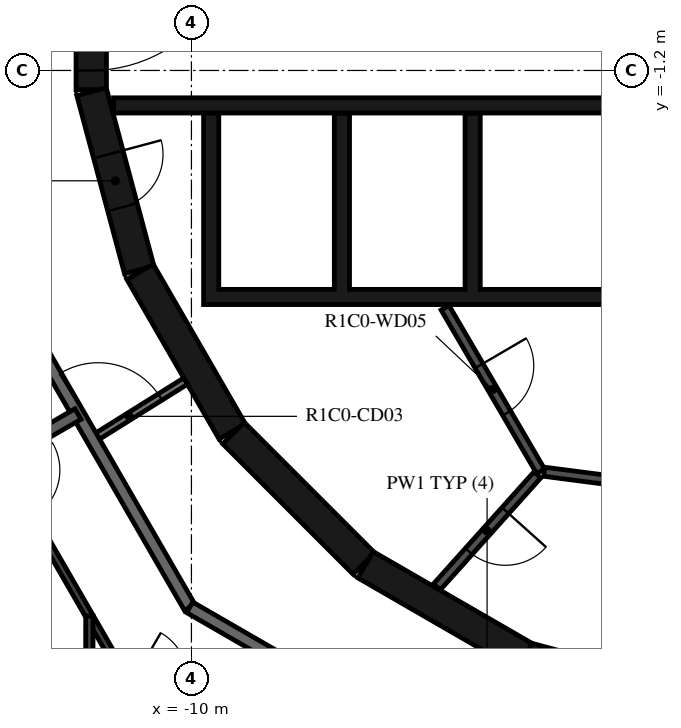
"""IFC4 building model, lengths in metres.
Left out: names, types, materials, properties, quantities, classifications, styles, units other than length and angle.
Written with IfcOpenShell. Run it as: python <this file> out.ifc"""

import sys

from ifc_helpers import new_model, si_unit, direction, frame, frame_2d, origin, place, context, subcontext, project, spatial, polyline, rectangle, outline, extrude, element, fill, save


model = new_model("IFC4")
c1 = context("Model", 3, precision=1e-05, world=origin(), true_north=direction((0.0, 1.0)))
c2 = subcontext(c1, "Body", "Model", "MODEL_VIEW")
j1 = project(units=[si_unit("LENGTHUNIT", "METRE"), si_unit("PLANEANGLEUNIT", "RADIAN")], contexts=[c1])
p1 = place(None, origin())
s1 = spatial("IfcSite", under=j1, at=p1, CompositionType="ELEMENT")
p2 = place(p1, origin())
s2 = spatial("IfcBuilding", under=s1, at=p2, CompositionType="ELEMENT")
p3 = place(p2, frame((0.0, 0.0, 66.4)))
s3 = spatial("IfcBuildingStorey", under=s2, at=p3, CompositionType="ELEMENT", Elevation=66.4)
p4 = place(p3, frame((-11.647, 1.516, 0.0), z_axis=(0.0, 0.0, 1.0), x_axis=(0.0, -1.0, 0.0)))
e1 = element("IfcWall", 1, at=p4, inside=s3, PredefinedType="SHEAR", context=c2, shape_type="SweptSolid", body=[
    extrude(rectangle(XDim=3.033, YDim=0.5, at=frame_2d((1.516, 0.0))), origin(), (0.0, 0.0, 1.0), 3.05),
])
p5 = place(p4, frame((0.316, 0.0, 0.0)))
e2 = element("IfcOpeningElement", 2, at=p5, cuts=e1, PredefinedType="OPENING", context=c2, shape_type="SweptSolid", body=[
    extrude(rectangle(XDim=2.4, YDim=2.1, at=frame_2d((1.2, 1.05))), frame((0.0, 0.26, 0.0), z_axis=(0.0, -1.0, 0.0), x_axis=(1.0, 0.0, 0.0)), (0.0, 0.0, 1.0), 0.52),
])
p6 = place(p3, frame((-11.643, -1.55, 0.0), z_axis=(0.0, 0.0, 1.0), x_axis=(0.258734743916, -0.965948410781, 0.0)))
e3 = element("IfcWall", 3, at=p6, inside=s3, PredefinedType="SHEAR", context=c2, shape_type="SweptSolid", body=[
    extrude(rectangle(XDim=3.033, YDim=0.5, at=frame_2d((1.516, 0.0))), origin(), (0.0, 0.0, 1.0), 3.05),
])
p7 = place(p6, frame((1.066, 0.0, 0.0)))
e4 = element("IfcOpeningElement", 4, at=p7, cuts=e3, PredefinedType="OPENING", context=c2, shape_type="SweptSolid", body=[
    extrude(rectangle(XDim=0.9, YDim=2.1, at=frame_2d((0.45, 1.05))), frame((0.0, 0.26, 0.0), z_axis=(0.0, -1.0, 0.0), x_axis=(1.0, 0.0, 0.0)), (0.0, 0.0, 1.0), 0.52),
])
p8 = place(p3, frame((-10.845, -4.51, 0.0), z_axis=(0.0, 0.0, 1.0), x_axis=(0.500087131594, -0.865975092491, 0.0)))
e5 = element("IfcWall", 5, at=p8, inside=s3, PredefinedType="SHEAR", context=c2, shape_type="SweptSolid", body=[
    extrude(rectangle(XDim=3.033, YDim=0.5, at=frame_2d((1.516, 0.0))), origin(), (0.0, 0.0, 1.0), 3.05),
])
p9 = place(p3, frame((-9.308, -7.164, 0.0), z_axis=(0.0, 0.0, 1.0), x_axis=(0.707106781187, -0.707106781187, 0.0)))
e6 = element("IfcWall", 6, at=p9, inside=s3, PredefinedType="SHEAR", context=c2, shape_type="SweptSolid", body=[
    extrude(rectangle(XDim=3.032, YDim=0.5, at=frame_2d((1.516, 0.0))), origin(), (0.0, 0.0, 1.0), 3.05),
])
for number, where, z_axis, x_axis in (
    (7, (-7.137, -9.329, 0.0), (0.0, 0.0, 1.0), (0.866, -0.5, 0.0)),
    (8, (-4.479, -10.858, 0.0), (0.0, 0.0, 1.0), (0.966, -0.259, 0.0)),
):
    element("IfcWall", number, at=place(p3, frame(where, z_axis=z_axis, x_axis=x_axis)), inside=s3, PredefinedType="SHEAR", context=c2, shape_type="SweptSolid", body=[
        extrude(rectangle(XDim=3.033, YDim=0.5, at=frame_2d((1.516, 0.0))), origin(), (0.0, 0.0, 1.0), 3.05),
    ])
p10 = place(p3, origin())
e9 = element("IfcWall", 9, at=p10, inside=s3, PredefinedType="SHEAR", context=c2, shape_type="SweptSolid", body=[
    extrude(outline(polyline([(9.8, -5.05), (9.8, -4.8), (9.8, -1.9), (9.55, -1.9), (9.55, -4.8), (7.65, -4.8), (7.65, -1.9), (7.4, -1.9), (7.4, -4.8), (5.5, -4.8), (5.5, -1.9), (5.25, -1.9), (5.25, -4.8), (3.35, -4.8), (3.35, -1.9), (3.1, -1.9), (3.1, -4.8), (-5.25, -4.8), (-5.25, -1.9), (-5.5, -1.9), (-5.5, -4.8), (-7.4, -4.8), (-7.4, -1.9), (-7.65, -1.9), (-7.65, -4.8), (-9.55, -4.8), (-9.55, -1.9), (-9.8, -1.9), (-9.8, -4.8), (-9.8, -5.05), (9.8, -5.05)])), origin(), (0.0, 0.0, 1.0), 3.05),
])
p11 = place(p3, frame((-11.28, -1.775, 0.0), z_axis=(0.0, 0.0, 1.0), x_axis=(1.0, 0.0, 0.0)))
e10 = element("IfcWall", 10, at=p11, inside=s3, PredefinedType="SHEAR", context=c2, shape_type="SweptSolid", body=[
    extrude(rectangle(XDim=14.38, YDim=0.25, at=frame_2d((7.19, 0.0))), origin(), (0.0, 0.0, 1.0), 3.05),
])
p12 = place(p11, frame((9.755, 0.0, 0.0)))
e11 = element("IfcOpeningElement", 11, at=p12, cuts=e10, PredefinedType="OPENING", context=c2, shape_type="SweptSolid", body=[
    extrude(rectangle(XDim=0.9, YDim=2.1, at=frame_2d((0.45, 1.05))), frame((0.0, 0.135, 0.0), z_axis=(0.0, -1.0, 0.0), x_axis=(1.0, 0.0, 0.0)), (0.0, 0.0, 1.0), 0.27),
])
p13 = place(p3, frame((-5.829, -5.102, 0.0), z_axis=(0.0, 0.0, 1.0), x_axis=(0.504480008384, -0.863423373057, 0.0)))
e12 = element("IfcWall", 12, at=p13, inside=s3, PredefinedType="PARTITIONING", context=c2, shape_type="SweptSolid", body=[
    extrude(rectangle(XDim=3.115, YDim=0.15, at=frame_2d((1.558, 0.0))), origin(), (0.0, 0.0, 1.0), 3.05),
])
p14 = place(p13, frame((1.107, 0.0, 0.0)))
e13 = element("IfcOpeningElement", 13, at=p14, cuts=e12, PredefinedType="OPENING", context=c2, shape_type="SweptSolid", body=[
    extrude(rectangle(XDim=0.9, YDim=2.1, at=frame_2d((0.45, 1.05))), frame((0.0, 0.085, 0.0), z_axis=(0.0, -1.0, 0.0), x_axis=(1.0, 0.0, 0.0)), (0.0, 0.0, 1.0), 0.17),
])
p15 = place(p3, frame((-4.311, -7.851, 0.0), z_axis=(0.0, 0.0, 1.0), x_axis=(-0.667869133096, -0.744278725383, 0.0)))
e14 = element("IfcWall", 14, at=p15, inside=s3, PredefinedType="PARTITIONING", context=c2, shape_type="SweptSolid", body=[
    extrude(rectangle(XDim=2.476, YDim=0.15, at=frame_2d((1.238, 0.0))), origin(), (0.0, 0.0, 1.0), 3.05),
])
p16 = place(p15, frame((0.788, 0.0, 0.0)))
e15 = element("IfcOpeningElement", 15, at=p16, cuts=e14, PredefinedType="OPENING", context=c2, shape_type="SweptSolid", body=[
    extrude(rectangle(XDim=0.9, YDim=2.1, at=frame_2d((0.45, 1.05))), frame((0.0, 0.085, 0.0), z_axis=(0.0, -1.0, 0.0), x_axis=(1.0, 0.0, 0.0)), (0.0, 0.0, 1.0), 0.17),
])
p17 = place(p3, frame((-4.198, -7.799, 0.0), z_axis=(0.0, 0.0, 1.0), x_axis=(0.991686747293, -0.128675542523, 0.0)))
e16 = element("IfcWall", 16, at=p17, inside=s3, PredefinedType="PARTITIONING", context=c2, shape_type="SweptSolid", body=[
    extrude(rectangle(XDim=1.793, YDim=0.15, at=frame_2d((0.896, 0.0))), origin(), (0.0, 0.0, 1.0), 3.05),
])
p18 = place(p3, frame((-11.625, -7.264, 0.0), z_axis=(0.0, 0.0, 1.0), x_axis=(0.84803632456, 0.529938102259, 0.0)))
e17 = element("IfcWall", 17, at=p18, inside=s3, PredefinedType="PARTITIONING", context=c2, shape_type="SweptSolid", body=[
    extrude(rectangle(XDim=1.804, YDim=0.12, at=frame_2d((0.902, 0.0))), origin(), (0.0, 0.0, 1.0), 3.05),
])
p19 = place(p18, frame((0.11, 0.0, 0.0)))
e18 = element("IfcOpeningElement", 18, at=p19, cuts=e17, PredefinedType="OPENING", context=c2, shape_type="SweptSolid", body=[
    extrude(rectangle(XDim=1.2, YDim=2.1, at=frame_2d((0.6, 1.05))), frame((0.0, 0.07, 0.0), z_axis=(0.0, -1.0, 0.0), x_axis=(1.0, 0.0, 0.0)), (0.0, 0.0, 1.0), 0.14),
])
p20 = place(p3, frame((-13.7, -3.671, 0.0), z_axis=(0.0, 0.0, 1.0), x_axis=(0.500001669485, -0.866024439905, 0.0)))
e19 = element("IfcWall", 19, at=p20, inside=s3, PredefinedType="STANDARD", context=c2, shape_type="SweptSolid", body=[
    extrude(rectangle(XDim=7.342, YDim=0.2, at=frame_2d((3.671, 0.0))), origin(), (0.0, 0.0, 1.0), 3.05),
])
p21 = place(p3, frame((-10.029, -10.029, 0.0), z_axis=(0.0, 0.0, 1.0), x_axis=(0.866022878987, -0.500004373052, 0.0)))
e20 = element("IfcWall", 20, at=p21, inside=s3, PredefinedType="STANDARD", context=c2, shape_type="SweptSolid", body=[
    extrude(rectangle(XDim=7.146, YDim=0.2, at=frame_2d((3.573, 0.0))), origin(), (0.0, 0.0, 1.0), 3.05),
])
p22 = place(p21, frame((5.947, 0.0, 0.0)))
e21 = element("IfcOpeningElement", 21, at=p22, cuts=e20, PredefinedType="OPENING", context=c2, shape_type="SweptSolid", body=[
    extrude(rectangle(XDim=1.0, YDim=2.1, at=frame_2d((0.5, 1.05))), frame((0.0, 0.11, 0.0), z_axis=(0.0, -1.0, 0.0), x_axis=(1.0, 0.0, 0.0)), (0.0, 0.0, 1.0), 0.22),
])
p23 = place(p3, frame((-16.565, -9.564, 0.0), z_axis=(0.0, 0.0, 1.0), x_axis=(0.866028274568, 0.499995027624, 0.0)))
e22 = element("IfcWall", 22, at=p23, inside=s3, PredefinedType="STANDARD", context=c2, shape_type="SweptSolid", body=[
    extrude(rectangle(XDim=5.427, YDim=0.2, at=frame_2d((2.714, 0.0))), origin(), (0.0, 0.0, 1.0), 3.05),
])
p24 = place(p3, frame((-13.164, -7.6, 0.0), z_axis=(0.0, 0.0, 1.0), x_axis=(0.500000928893, -0.866024867487, 0.0)))
e23 = element("IfcWall", 23, at=p24, inside=s3, PredefinedType="PARTITIONING", context=c2, shape_type="SweptSolid", body=[
    extrude(rectangle(XDim=4.073, YDim=0.12, at=frame_2d((2.036, 0.0))), origin(), (0.0, 0.0, 1.0), 3.05),
])
p25 = place(p24, frame((0.2, 0.0, 0.0)))
e24 = element("IfcOpeningElement", 24, at=p25, cuts=e23, PredefinedType="OPENING", context=c2, shape_type="SweptSolid", body=[
    extrude(rectangle(XDim=0.9, YDim=2.1, at=frame_2d((0.45, 1.05))), frame((0.0, 0.07, 0.0), z_axis=(0.0, -1.0, 0.0), x_axis=(1.0, 0.0, 0.0)), (0.0, 0.0, 1.0), 0.14),
])
p26 = place(p3, frame((-11.678, -13.63, 0.0), z_axis=(0.0, 0.0, 1.0), x_axis=(0.0, 1.0, 0.0)))
e25 = element("IfcWall", 25, at=p26, inside=s3, PredefinedType="PARTITIONING", context=c2, shape_type="SweptSolid", body=[
    extrude(rectangle(XDim=3.458, YDim=0.12, at=frame_2d((1.729, 0.0))), origin(), (0.0, 0.0, 1.0), 3.05),
])
p27 = place(p5, origin())
e26 = element("IfcDoor", 26, at=p27, inside=s3, OperationType="DOUBLE_DOOR_SINGLE_SWING", PredefinedType="DOOR", context=c2, shape_type="SweptSolid", body=[
    extrude(rectangle(XDim=2.4, YDim=2.1, at=frame_2d((1.2, 1.05))), frame((0.0, 0.025, 0.0), z_axis=(0.0, -1.0, 0.0), x_axis=(1.0, 0.0, 0.0)), (0.0, 0.0, 1.0), 0.05),
])
fill(e2, e26)
p28 = place(p16, origin())
e27 = element("IfcDoor", 27, at=p28, inside=s3, OperationType="SINGLE_SWING_LEFT", PredefinedType="DOOR", context=c2, shape_type="SweptSolid", body=[
    extrude(rectangle(XDim=0.9, YDim=2.1, at=frame_2d((0.45, 1.05))), frame((0.0, 0.025, 0.0), z_axis=(0.0, -1.0, 0.0), x_axis=(1.0, 0.0, 0.0)), (0.0, 0.0, 1.0), 0.05),
])
fill(e15, e27)
p29 = place(p14, origin())
e28 = element("IfcDoor", 28, at=p29, inside=s3, OperationType="SINGLE_SWING_RIGHT", PredefinedType="DOOR", context=c2, shape_type="SweptSolid", body=[
    extrude(rectangle(XDim=0.9, YDim=2.1, at=frame_2d((0.45, 1.05))), frame((0.0, 0.025, 0.0), z_axis=(0.0, -1.0, 0.0), x_axis=(1.0, 0.0, 0.0)), (0.0, 0.0, 1.0), 0.05),
])
fill(e13, e28)
p30 = place(p7, origin())
e29 = element("IfcDoor", 29, at=p30, inside=s3, OperationType="SINGLE_SWING_LEFT", PredefinedType="DOOR", context=c2, shape_type="SweptSolid", body=[
    extrude(rectangle(XDim=0.9, YDim=2.1, at=frame_2d((0.45, 1.05))), frame((0.0, 0.025, 0.0), z_axis=(0.0, -1.0, 0.0), x_axis=(1.0, 0.0, 0.0)), (0.0, 0.0, 1.0), 0.05),
])
fill(e4, e29)
p31 = place(p19, origin())
e30 = element("IfcDoor", 30, at=p31, inside=s3, OperationType="DOUBLE_DOOR_SINGLE_SWING", PredefinedType="DOOR", context=c2, shape_type="SweptSolid", body=[
    extrude(rectangle(XDim=1.2, YDim=2.1, at=frame_2d((0.6, 1.05))), frame((0.0, 0.025, 0.0), z_axis=(0.0, -1.0, 0.0), x_axis=(1.0, 0.0, 0.0)), (0.0, 0.0, 1.0), 0.05),
])
fill(e18, e30)
save(model, sys.argv[1])
